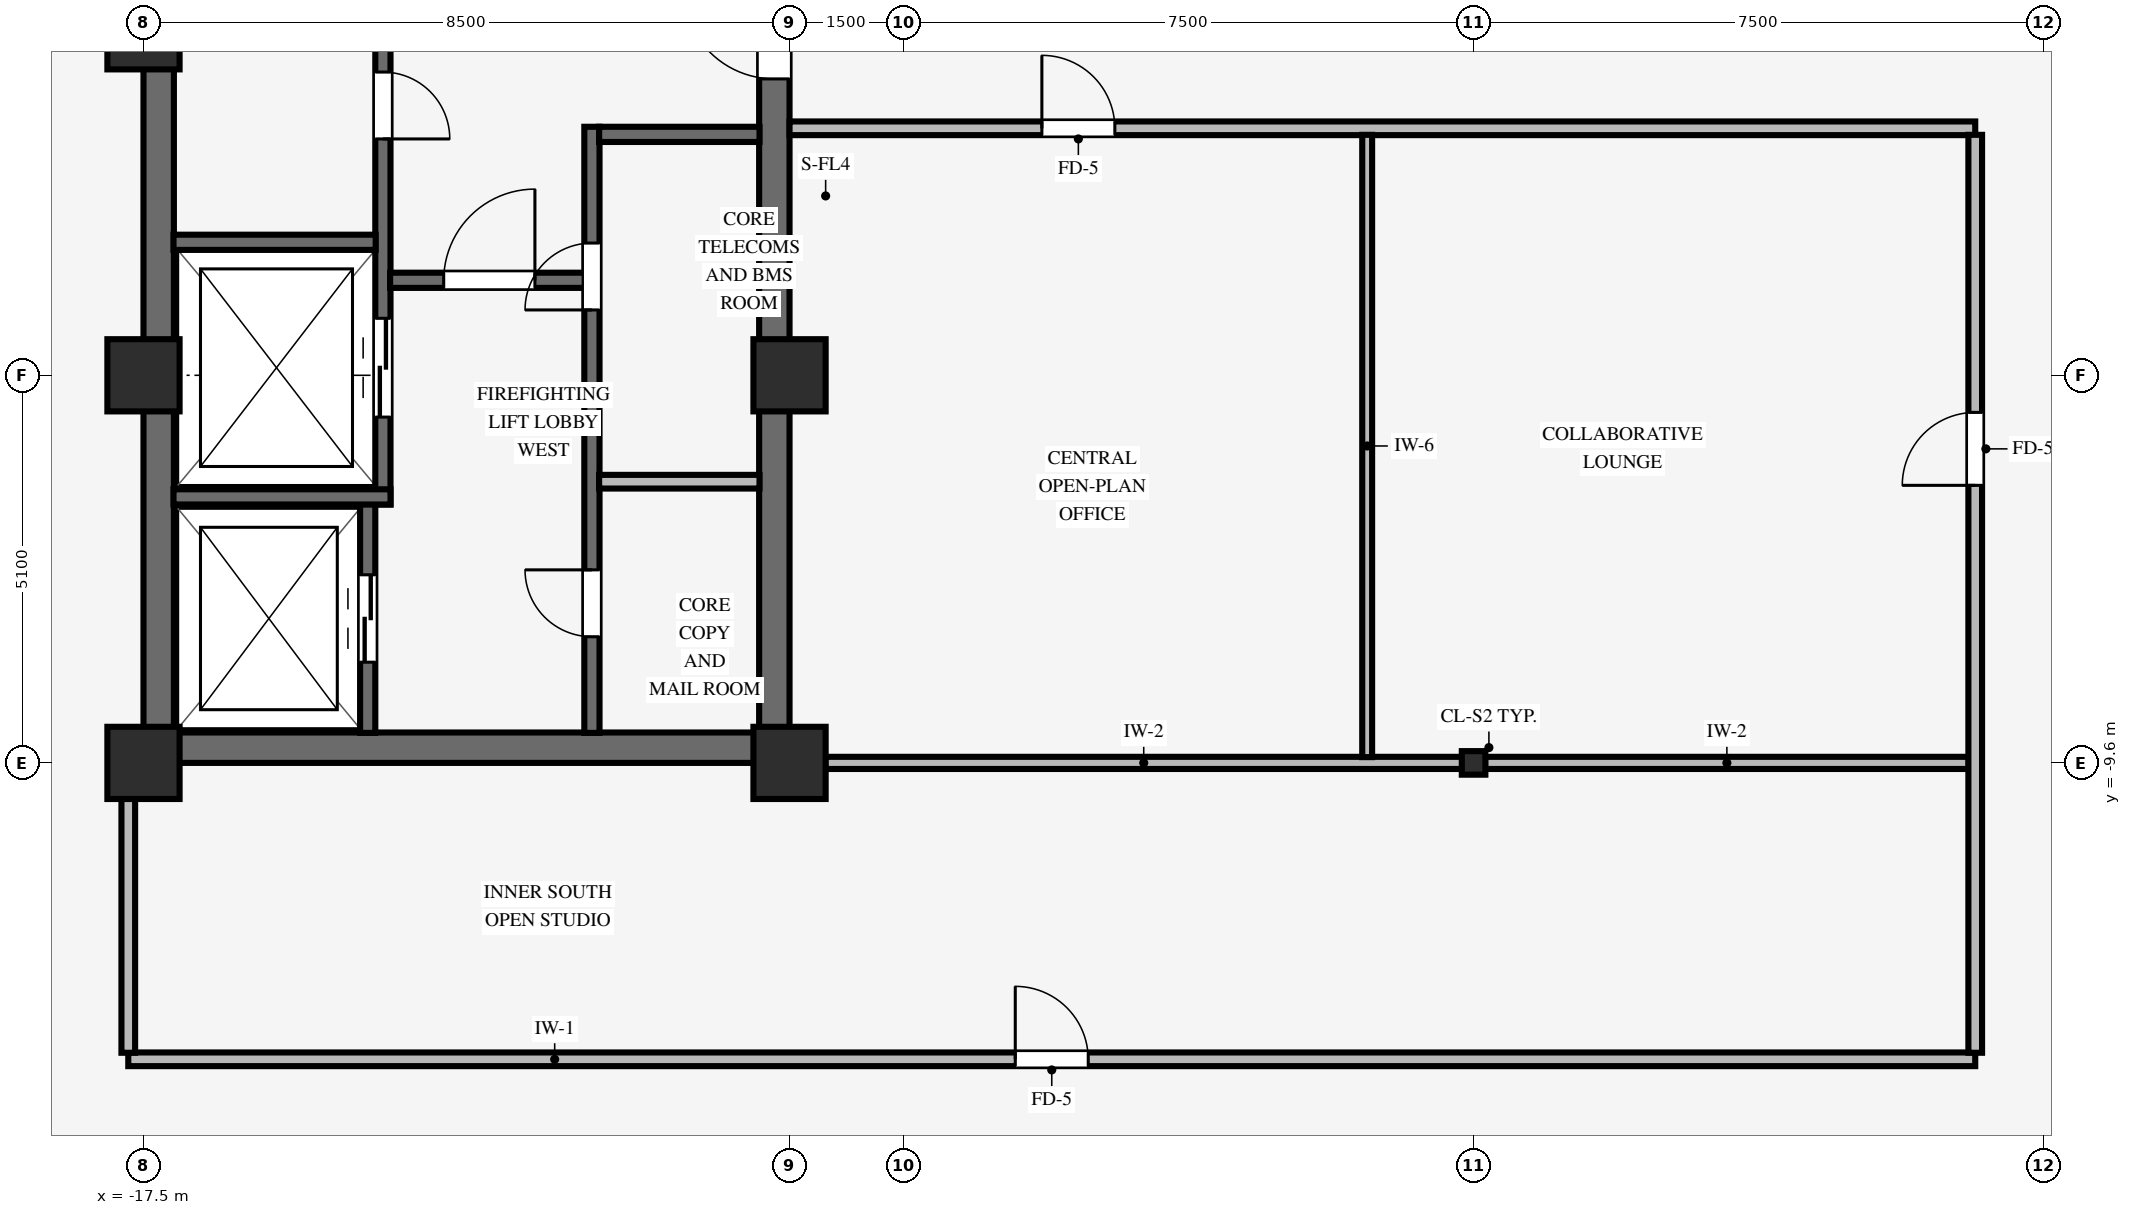
"""IFC4 building model, lengths in metres.
Left out: names, types, materials, properties, quantities, classifications, styles, units other than length and angle.
Written with IfcOpenShell. Run it as: python <this file> out.ifc"""

import sys

from ifc_helpers import new_model, si_unit, direction, frame, frame_2d, origin, origin_2d, place, context, subcontext, project, spatial, rectangle, i_section, extrude, source, transform, mapped, element, fill, save


model = new_model("IFC4")
c1 = context("Model", 3, precision=1e-05, world=origin(), true_north=direction((0.0, 1.0)))
c2 = subcontext(c1, "Body", "Model", "MODEL_VIEW")
j1 = project(units=[si_unit("LENGTHUNIT", "METRE"), si_unit("PLANEANGLEUNIT", "RADIAN")], contexts=[c1])
p1 = place(None, origin())
s1 = spatial("IfcSite", under=j1, at=p1, CompositionType="ELEMENT")
p2 = place(p1, origin())
s2 = spatial("IfcBuilding", under=s1, at=p2, CompositionType="ELEMENT")
p3 = place(p2, frame((0.0, 0.0, 174.95)))
s3 = spatial("IfcBuildingStorey", under=s2, at=p3, CompositionType="ELEMENT", Elevation=174.95)
p4 = place(p3, frame((-17.5, -9.4, 0.0), z_axis=(0.0, 0.0, 1.0), x_axis=(1.0, 0.0, 0.0)))
e1 = element("IfcWall", 1, at=p4, inside=s3, PredefinedType="SHEAR", context=c2, shape_type="SweptSolid", body=[
    extrude(rectangle(XDim=8.5, YDim=0.4, at=frame_2d((4.25, 0.0))), origin(), (0.0, 0.0, 1.0), 3.37),
])
p5 = place(p3, frame((-17.3, -9.205, 0.0), z_axis=(0.0, 0.0, 1.0), x_axis=(0.0, 1.0, 0.0)))
e2 = element("IfcWall", 2, at=p5, inside=s3, PredefinedType="SHEAR", context=c2, shape_type="SweptSolid", body=[
    extrude(rectangle(XDim=18.41, YDim=0.4, at=frame_2d((9.205, 0.0))), origin(), (0.0, 0.0, 1.0), 3.37),
])
p6 = place(p3, frame((-9.2, -9.205, 0.0), z_axis=(0.0, 0.0, 1.0), x_axis=(0.0, 1.0, 0.0)))
e3 = element("IfcWall", 3, at=p6, inside=s3, PredefinedType="SHEAR", context=c2, shape_type="SweptSolid", body=[
    extrude(rectangle(XDim=18.41, YDim=0.4, at=frame_2d((9.205, 0.0))), origin(), (0.0, 0.0, 1.0), 3.37),
])
p7 = place(p6, frame((8.605, 0.0, 0.0)))
e4 = element("IfcOpeningElement", 4, at=p7, cuts=e3, PredefinedType="OPENING", context=c2, shape_type="SweptSolid", body=[
    extrude(rectangle(XDim=1.2, YDim=2.15, at=frame_2d((0.6, 1.075))), frame((0.0, 0.21, 0.0), z_axis=(0.0, -1.0, 0.0), x_axis=(1.0, 0.0, 0.0)), (0.0, 0.0, 1.0), 0.42),
])
for number, where, z_axis, x_axis in (
    (5, (-17.5, -9.6, 0.0), (0.0, 0.0, 1.0), (1.0, 0.0, 0.0)),
    (6, (-17.5, -4.5, 0.0), (0.0, 0.0, 1.0), (1.0, 0.0, 0.0)),
    (7, (-9.0, -9.6, 0.0), (0.0, 0.0, 1.0), (1.0, 0.0, 0.0)),
    (8, (-9.0, -4.5, 0.0), (0.0, 0.0, 1.0), (1.0, 0.0, 0.0)),
    (9, (-17.5, 0.0, 0.0), (0.0, 0.0, 1.0), (1.0, 0.0, 0.0)),
):
    element("IfcColumn", number, at=place(p3, frame(where, z_axis=z_axis, x_axis=x_axis)), inside=s3, PredefinedType="COLUMN", context=c2, shape_type="SweptSolid", body=[
        extrude(rectangle(XDim=0.95, YDim=0.95, at=origin_2d()), origin(), (0.0, 0.0, 1.0), 3.37),
    ])
p8 = place(p3, frame((0.0, -9.6, 0.0), z_axis=(0.0, 0.0, 1.0), x_axis=(1.0, 0.0, 0.0)))
e10 = element("IfcColumn", 10, at=p8, inside=s3, PredefinedType="COLUMN", context=c2, shape_type="SweptSolid", body=[
    extrude(i_section(OverallWidth=0.31, OverallDepth=0.31, WebThickness=0.015, FlangeThickness=0.015, FilletRadius=0.015, at=origin_2d()), origin(), (0.0, 0.0, 1.0), 3.37),
])
p9 = place(p3, frame((-14.55, -9.205, 0.0), z_axis=(0.0, 0.0, 1.0), x_axis=(0.0, 1.0, 0.0)))
e11 = element("IfcWall", 11, at=p9, inside=s3, PredefinedType="SHEAR", context=c2, shape_type="SweptSolid", body=[
    extrude(rectangle(XDim=3.01, YDim=0.2, at=frame_2d((1.505, 0.0))), origin(), (0.0, 0.0, 1.0), 3.37),
])
p10 = place(p9, frame((0.93, 0.0, 0.0)))
e12 = element("IfcOpeningElement", 12, at=p10, cuts=e11, PredefinedType="OPENING", context=c2, shape_type="SweptSolid", body=[
    extrude(rectangle(XDim=1.15, YDim=2.15, at=frame_2d((0.575, 1.075))), frame((0.0, 0.11, 0.0), z_axis=(0.0, -1.0, 0.0), x_axis=(1.0, 0.0, 0.0)), (0.0, 0.0, 1.0), 0.22),
])
p11 = place(p3, frame((-14.35, -6.2, 0.0), z_axis=(0.0, 0.0, 1.0), x_axis=(0.0, 1.0, 0.0)))
e13 = element("IfcWall", 13, at=p11, inside=s3, PredefinedType="SHEAR", context=c2, shape_type="SweptSolid", body=[
    extrude(rectangle(XDim=7.105, YDim=0.2, at=frame_2d((3.552, 0.0))), origin(), (0.0, 0.0, 1.0), 3.37),
])
p12 = place(p11, frame((5.69, 0.0, 0.0), z_axis=(0.0, 0.0, 1.0), x_axis=(-1.0, 0.0, 0.0)))
e14 = element("IfcOpeningElement", 14, at=p12, cuts=e13, PredefinedType="OPENING", context=c2, shape_type="SweptSolid", body=[
    extrude(rectangle(XDim=0.88, YDim=2.1, at=frame_2d((0.44, 1.05))), frame((0.0, 0.11, 0.0), z_axis=(0.0, -1.0, 0.0), x_axis=(1.0, 0.0, 0.0)), (0.0, 0.0, 1.0), 0.22),
])
p13 = place(p11, frame((1.15, 0.0, 0.0)))
e15 = element("IfcOpeningElement", 15, at=p13, cuts=e13, PredefinedType="OPENING", context=c2, shape_type="SweptSolid", body=[
    extrude(rectangle(XDim=1.3, YDim=2.2, at=frame_2d((0.65, 1.1))), frame((0.0, 0.11, 0.0), z_axis=(0.0, -1.0, 0.0), x_axis=(1.0, 0.0, 0.0)), (0.0, 0.0, 1.0), 0.22),
])
p14 = place(p3, frame((-17.105, -6.1, 0.0), z_axis=(0.0, 0.0, 1.0), x_axis=(1.0, 0.0, 0.0)))
e16 = element("IfcWall", 16, at=p14, inside=s3, PredefinedType="SHEAR", context=c2, shape_type="SweptSolid", body=[
    extrude(rectangle(XDim=2.855, YDim=0.2, at=frame_2d((1.427, 0.0))), origin(), (0.0, 0.0, 1.0), 3.37),
])
p15 = place(p3, frame((-17.105, -2.75, 0.0), z_axis=(0.0, 0.0, 1.0), x_axis=(1.0, 0.0, 0.0)))
e17 = element("IfcWall", 17, at=p15, inside=s3, PredefinedType="SHEAR", context=c2, shape_type="SweptSolid", body=[
    extrude(rectangle(XDim=2.66, YDim=0.2, at=frame_2d((1.33, 0.0))), origin(), (0.0, 0.0, 1.0), 3.37),
])
p16 = place(p3, frame((-11.6, -9.205, 0.0), z_axis=(0.0, 0.0, 1.0), x_axis=(0.0, 1.0, 0.0)))
e18 = element("IfcWall", 18, at=p16, inside=s3, PredefinedType="SHEAR", context=c2, shape_type="SweptSolid", body=[
    extrude(rectangle(XDim=7.975, YDim=0.2, at=frame_2d((3.988, 0.0))), origin(), (0.0, 0.0, 1.0), 3.37),
])
p17 = place(p16, frame((1.265, 0.0, 0.0)))
e19 = element("IfcOpeningElement", 19, at=p17, cuts=e18, PredefinedType="OPENING", context=c2, shape_type="SweptSolid", body=[
    extrude(rectangle(XDim=0.88, YDim=2.1, at=frame_2d((0.44, 1.05))), frame((0.0, 0.11, 0.0), z_axis=(0.0, -1.0, 0.0), x_axis=(1.0, 0.0, 0.0)), (0.0, 0.0, 1.0), 0.22),
])
p18 = place(p16, frame((5.565, 0.0, 0.0)))
e20 = element("IfcOpeningElement", 20, at=p18, cuts=e18, PredefinedType="OPENING", context=c2, shape_type="SweptSolid", body=[
    extrude(rectangle(XDim=0.88, YDim=2.1, at=frame_2d((0.44, 1.05))), frame((0.0, 0.11, 0.0), z_axis=(0.0, -1.0, 0.0), x_axis=(1.0, 0.0, 0.0)), (0.0, 0.0, 1.0), 0.22),
])
p19 = place(p3, frame((-14.255, -3.25, 0.0), z_axis=(0.0, 0.0, 1.0), x_axis=(1.0, 0.0, 0.0)))
e21 = element("IfcWall", 21, at=p19, inside=s3, PredefinedType="SHEAR", context=c2, shape_type="SweptSolid", body=[
    extrude(rectangle(XDim=2.56, YDim=0.2, at=frame_2d((1.28, 0.0))), origin(), (0.0, 0.0, 1.0), 3.37),
])
p20 = place(p19, frame((0.705, 0.0, 0.0)))
e22 = element("IfcOpeningElement", 22, at=p20, cuts=e21, PredefinedType="OPENING", context=c2, shape_type="SweptSolid", body=[
    extrude(rectangle(XDim=1.2, YDim=2.15, at=frame_2d((0.6, 1.075))), frame((0.0, 0.11, 0.0), z_axis=(0.0, -1.0, 0.0), x_axis=(1.0, 0.0, 0.0)), (0.0, 0.0, 1.0), 0.22),
])
p21 = place(p3, frame((-11.505, -1.33, 0.0), z_axis=(0.0, 0.0, 1.0), x_axis=(1.0, 0.0, 0.0)))
e23 = element("IfcWall", 23, at=p21, inside=s3, PredefinedType="SHEAR", context=c2, shape_type="SweptSolid", body=[
    extrude(rectangle(XDim=2.11, YDim=0.2, at=frame_2d((1.055, 0.0))), origin(), (0.0, 0.0, 1.0), 3.37),
])
p22 = place(p3, frame((-11.505, -5.9, 0.0), z_axis=(0.0, 0.0, 1.0), x_axis=(1.0, 0.0, 0.0)))
e24 = element("IfcWall", 24, at=p22, inside=s3, PredefinedType="PARTITIONING", context=c2, shape_type="SweptSolid", body=[
    extrude(rectangle(XDim=2.11, YDim=0.18, at=frame_2d((1.055, 0.0))), origin(), (0.0, 0.0, 1.0), 3.36),
])
p23 = place(p3, frame((-17.7, -13.5, 0.0), z_axis=(0.0, 0.0, 1.0), x_axis=(1.0, 0.0, 0.0)))
e25 = element("IfcWall", 25, at=p23, inside=s3, PredefinedType="PARTITIONING", context=c2, shape_type="SweptSolid", body=[
    extrude(rectangle(XDim=24.3, YDim=0.18, at=frame_2d((12.15, 0.0))), origin(), (0.0, 0.0, 1.0), 3.008),
])
p24 = place(p23, frame((11.67, 0.0, 0.0)))
e26 = element("IfcOpeningElement", 26, at=p24, cuts=e25, PredefinedType="OPENING", context=c2, shape_type="SweptSolid", body=[
    extrude(rectangle(XDim=0.96, YDim=2.1, at=frame_2d((0.48, 1.05))), frame((0.0, 0.1, 0.0), z_axis=(0.0, -1.0, 0.0), x_axis=(1.0, 0.0, 0.0)), (0.0, 0.0, 1.0), 0.2),
])
p25 = place(p3, frame((-8.529, -9.6, 0.0), z_axis=(0.0, 0.0, 1.0), x_axis=(1.0, 0.0, 0.0)))
e27 = element("IfcWall", 27, at=p25, inside=s3, PredefinedType="PARTITIONING", context=c2, shape_type="SweptSolid", body=[
    extrude(rectangle(XDim=8.378, YDim=0.16, at=frame_2d((4.189, 0.0))), origin(), (0.0, 0.0, 1.0), 2.405),
])
p26 = place(p3, frame((0.151, -9.6, 0.0), z_axis=(0.0, 0.0, 1.0), x_axis=(1.0, 0.0, 0.0)))
e28 = element("IfcWall", 28, at=p26, inside=s3, PredefinedType="PARTITIONING", context=c2, shape_type="SweptSolid", body=[
    extrude(rectangle(XDim=6.363, YDim=0.16, at=frame_2d((3.182, 0.0))), origin(), (0.0, 0.0, 1.0), 2.405),
])
p27 = place(p3, frame((-9.0, -1.25, 0.0), z_axis=(0.0, 0.0, 1.0), x_axis=(1.0, 0.0, 0.0)))
e29 = element("IfcWall", 29, at=p27, inside=s3, PredefinedType="PARTITIONING", context=c2, shape_type="SweptSolid", body=[
    extrude(rectangle(XDim=15.6, YDim=0.18, at=frame_2d((7.8, 0.0))), origin(), (0.0, 0.0, 1.0), 3.36),
])
p28 = place(p27, frame((3.32, 0.0, 0.0)))
e30 = element("IfcOpeningElement", 30, at=p28, cuts=e29, PredefinedType="OPENING", context=c2, shape_type="SweptSolid", body=[
    extrude(rectangle(XDim=0.96, YDim=2.1, at=frame_2d((0.48, 1.05))), frame((0.0, 0.1, 0.0), z_axis=(0.0, -1.0, 0.0), x_axis=(1.0, 0.0, 0.0)), (0.0, 0.0, 1.0), 0.2),
])
p29 = place(p3, frame((-17.7, -13.414, 0.0), z_axis=(0.0, 0.0, 1.0), x_axis=(0.0, 1.0, 0.0)))
e31 = element("IfcWall", 31, at=p29, inside=s3, PredefinedType="PARTITIONING", context=c2, shape_type="SweptSolid", body=[
    extrude(rectangle(XDim=3.343, YDim=0.18, at=frame_2d((1.671, 0.0))), origin(), (0.0, 0.0, 1.0), 2.816),
])
p30 = place(p3, frame((-1.4, -9.524, 0.0), z_axis=(0.0, 0.0, 1.0), x_axis=(0.0, 1.0, 0.0)))
e32 = element("IfcWall", 32, at=p30, inside=s3, PredefinedType="PARTITIONING", context=c2, shape_type="SweptSolid", body=[
    extrude(rectangle(XDim=8.188, YDim=0.13, at=frame_2d((4.094, 0.0))), origin(), (0.0, 0.0, 1.0), 3.36),
])
p31 = place(p3, frame((6.6, -13.414, 0.0), z_axis=(0.0, 0.0, 1.0), x_axis=(0.0, 1.0, 0.0)))
e33 = element("IfcWall", 33, at=p31, inside=s3, PredefinedType="PARTITIONING", context=c2, shape_type="SweptSolid", body=[
    extrude(rectangle(XDim=12.078, YDim=0.18, at=frame_2d((6.039, 0.0))), origin(), (0.0, 0.0, 1.0), 3.36),
])
p32 = place(p31, frame((7.466, 0.0, 0.0)))
e34 = element("IfcOpeningElement", 34, at=p32, cuts=e33, PredefinedType="OPENING", context=c2, shape_type="SweptSolid", body=[
    extrude(rectangle(XDim=0.96, YDim=2.1, at=frame_2d((0.48, 1.05))), frame((0.0, 0.1, 0.0), z_axis=(0.0, -1.0, 0.0), x_axis=(1.0, 0.0, 0.0)), (0.0, 0.0, 1.0), 0.2),
])
m1 = source(origin(), c2, "Body", "SweptSolid", [
    extrude(rectangle(XDim=0.88, YDim=2.1, at=frame_2d((0.44, 1.05))), frame((0.0, 0.025, 0.0), z_axis=(0.0, -1.0, 0.0), x_axis=(1.0, 0.0, 0.0)), (0.0, 0.0, 1.0), 0.05),
])
p33 = place(p12, origin())
e35 = element("IfcDoor", 35, at=p33, inside=s3, OperationType="SINGLE_SWING_RIGHT", PredefinedType="DOOR", context=c2, shape_type="MappedRepresentation", body=[
    mapped(m1, transform((0.0, 0.0, 0.0), scale=1.0)),
])
fill(e14, e35)
m2 = source(origin(), c2, "Body", "SweptSolid", [
    extrude(rectangle(XDim=1.2, YDim=2.15, at=frame_2d((0.6, 1.075))), frame((0.0, 0.025, 0.0), z_axis=(0.0, -1.0, 0.0), x_axis=(1.0, 0.0, 0.0)), (0.0, 0.0, 1.0), 0.05),
])
p34 = place(p20, origin())
e36 = element("IfcDoor", 36, at=p34, inside=s3, OperationType="SINGLE_SWING_RIGHT", PredefinedType="DOOR", context=c2, shape_type="MappedRepresentation", body=[
    mapped(m2, transform((0.0, 0.0, 0.0), scale=1.0)),
])
fill(e22, e36)
p35 = place(p17, origin())
e37 = element("IfcDoor", 37, at=p35, inside=s3, OperationType="SINGLE_SWING_RIGHT", PredefinedType="DOOR", context=c2, shape_type="MappedRepresentation", body=[
    mapped(m1, transform((0.0, 0.0, 0.0), scale=1.0)),
])
fill(e19, e37)
p36 = place(p18, origin())
e38 = element("IfcDoor", 38, at=p36, inside=s3, OperationType="SINGLE_SWING_LEFT", PredefinedType="DOOR", context=c2, shape_type="MappedRepresentation", body=[
    mapped(m1, transform((0.0, 0.0, 0.0), scale=1.0)),
])
fill(e20, e38)
p37 = place(p7, origin())
e39 = element("IfcDoor", 39, at=p37, inside=s3, OperationType="SINGLE_SWING_RIGHT", PredefinedType="DOOR", context=c2, shape_type="MappedRepresentation", body=[
    mapped(m2, transform((0.0, 0.0, 0.0), scale=1.0)),
])
fill(e4, e39)
m3 = source(origin(), c2, "Body", "SweptSolid", [
    extrude(rectangle(XDim=1.15, YDim=2.15, at=frame_2d((0.575, 1.075))), frame((0.0, 0.025, 0.0), z_axis=(0.0, -1.0, 0.0), x_axis=(1.0, 0.0, 0.0)), (0.0, 0.0, 1.0), 0.05),
])
p38 = place(p10, origin())
e40 = element("IfcDoor", 40, at=p38, inside=s3, OperationType="DOUBLE_DOOR_SLIDING", PredefinedType="DOOR", context=c2, shape_type="MappedRepresentation", body=[
    mapped(m3, transform((0.0, 0.0, 0.0), scale=1.0)),
])
fill(e12, e40)
m4 = source(origin(), c2, "Body", "SweptSolid", [
    extrude(rectangle(XDim=1.3, YDim=2.2, at=frame_2d((0.65, 1.1))), frame((0.0, 0.025, 0.0), z_axis=(0.0, -1.0, 0.0), x_axis=(1.0, 0.0, 0.0)), (0.0, 0.0, 1.0), 0.05),
])
p39 = place(p13, origin())
e41 = element("IfcDoor", 41, at=p39, inside=s3, OperationType="DOUBLE_DOOR_SLIDING", PredefinedType="DOOR", context=c2, shape_type="MappedRepresentation", body=[
    mapped(m4, transform((0.0, 0.0, 0.0), scale=1.0)),
])
fill(e15, e41)
m5 = source(origin(), c2, "Body", "SweptSolid", [
    extrude(rectangle(XDim=0.96, YDim=2.1, at=frame_2d((0.48, 1.05))), frame((0.0, 0.025, 0.0), z_axis=(0.0, -1.0, 0.0), x_axis=(1.0, 0.0, 0.0)), (0.0, 0.0, 1.0), 0.05),
])
p40 = place(p24, origin())
e42 = element("IfcDoor", 42, at=p40, inside=s3, OperationType="SINGLE_SWING_LEFT", PredefinedType="DOOR", context=c2, shape_type="MappedRepresentation", body=[
    mapped(m5, transform((0.0, 0.0, 0.0), scale=1.0)),
])
fill(e26, e42)
p41 = place(p32, origin())
e43 = element("IfcDoor", 43, at=p41, inside=s3, OperationType="SINGLE_SWING_LEFT", PredefinedType="DOOR", context=c2, shape_type="MappedRepresentation", body=[
    mapped(m5, transform((0.0, 0.0, 0.0), scale=1.0)),
])
fill(e34, e43)
p42 = place(p28, origin())
e44 = element("IfcDoor", 44, at=p42, inside=s3, OperationType="SINGLE_SWING_LEFT", PredefinedType="DOOR", context=c2, shape_type="MappedRepresentation", body=[
    mapped(m5, transform((0.0, 0.0, 0.0), scale=1.0)),
])
fill(e30, e44)
save(model, sys.argv[1])
